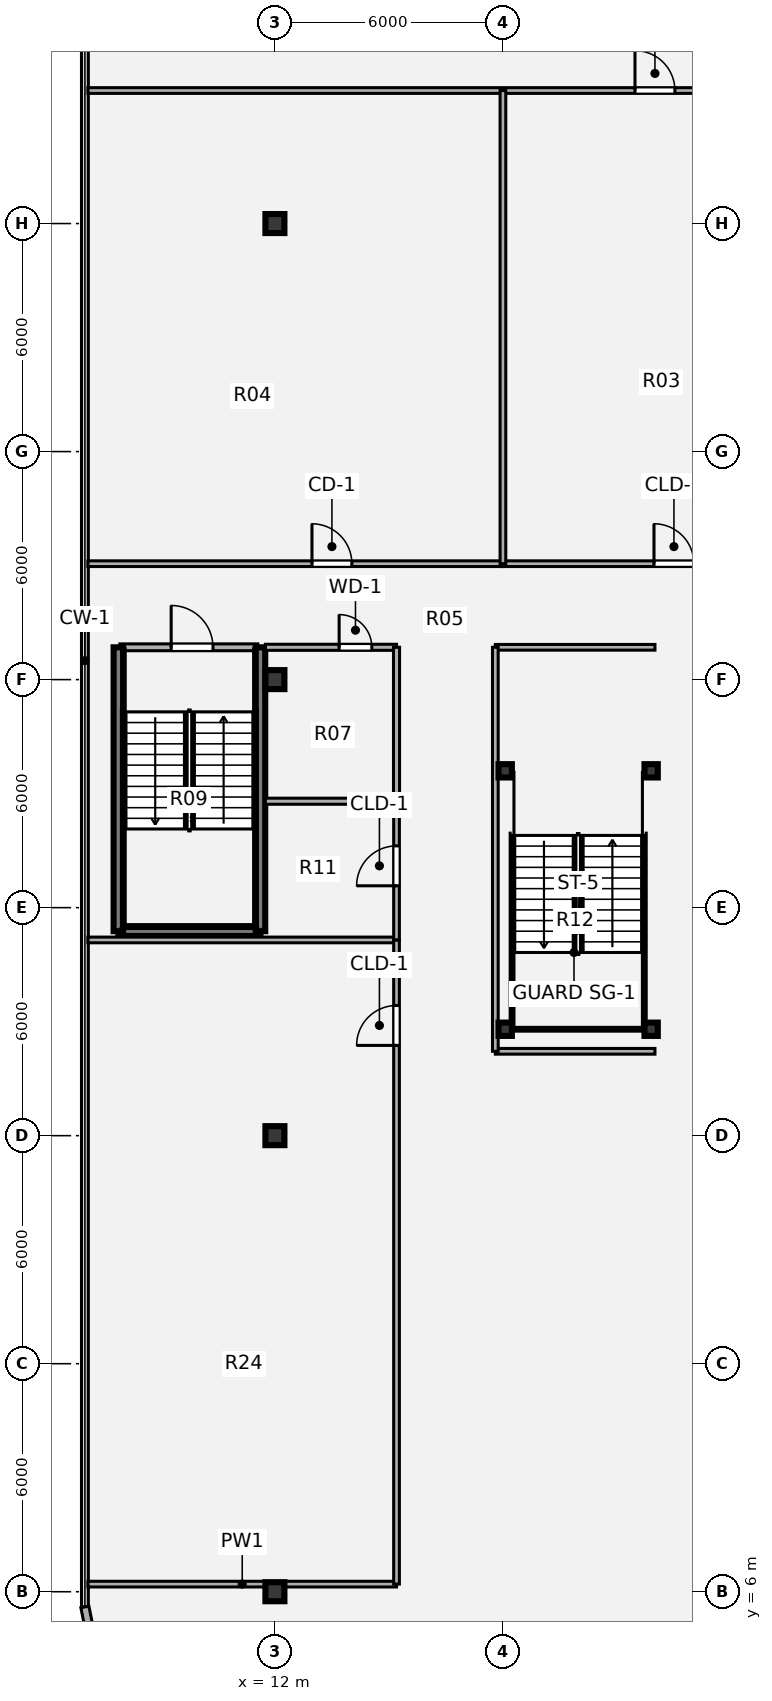
"""IFC4 building model, lengths in metres.
Left out: names, types, materials, properties, quantities, classifications, styles, units other than length and angle.
Written with IfcOpenShell. Run it as: python <this file> out.ifc"""

import sys

from ifc_helpers import new_model, si_unit, direction, frame, frame_2d, origin, origin_2d, place, context, subcontext, project, spatial, rectangle, hollow_rectangle, i_section, extrude, source, transform, mapped, element, fill, save


model = new_model("IFC4")
c1 = context("Model", 3, precision=1e-05, world=origin(), true_north=direction((0.0, 1.0)))
c2 = subcontext(c1, "Body", "Model", "MODEL_VIEW")
j1 = project(units=[si_unit("LENGTHUNIT", "METRE"), si_unit("PLANEANGLEUNIT", "RADIAN")], contexts=[c1])
p1 = place(None, origin())
s1 = spatial("IfcSite", under=j1, at=p1, CompositionType="ELEMENT")
p2 = place(p1, origin())
s2 = spatial("IfcBuilding", under=s1, at=p2, CompositionType="ELEMENT")
p3 = place(p2, frame((0.0, 0.0, 5.4)))
s3 = spatial("IfcBuildingStorey", under=s2, at=p3, CompositionType="ELEMENT", Elevation=5.4)
m1 = source(origin(), c2, "Body", "SweptSolid", [
    extrude(i_section(OverallWidth=0.5, OverallDepth=0.5, WebThickness=0.028, FlangeThickness=0.045, at=origin_2d()), origin(), (0.0, 0.0, 1.0), 4.32),
])
for number, where, z_axis, x_axis in (
    (1, (12.0, 6.0, 0.0), (0.0, 0.0, 1.0), (1.0, 0.0, 0.0)),
    (2, (12.0, 18.0, 0.0), (0.0, 0.0, 1.0), (1.0, 0.0, 0.0)),
    (3, (12.0, 30.0, 0.0), (0.0, 0.0, 1.0), (1.0, 0.0, 0.0)),
    (4, (12.0, 42.0, 0.0), (0.0, 0.0, 1.0), (1.0, 0.0, 0.0)),
):
    element("IfcColumn", number, at=place(p3, frame(where, z_axis=z_axis, x_axis=x_axis)), inside=s3, PredefinedType="COLUMN", context=c2, shape_type="MappedRepresentation", body=[
        mapped(m1, transform((0.0, 0.0, 0.0), x_axis=(1.0, 0.0, 0.0), y_axis=(0.0, 1.0, 0.0), z_axis=(0.0, 0.0, 1.0), scale=1.0)),
    ])
m2 = source(origin(), c2, "Body", "SweptSolid", [
    extrude(hollow_rectangle(XDim=0.35, YDim=0.35, WallThickness=0.016, OuterFilletRadius=0.032, at=origin_2d()), origin(), (0.0, 0.0, 1.0), 4.32),
])
for number, where, z_axis, x_axis in (
    (5, (18.06, 20.8, 0.0), (0.0, 0.0, 1.0), (1.0, 0.0, 0.0)),
    (6, (21.9, 20.8, 0.0), (0.0, 0.0, 1.0), (1.0, 0.0, 0.0)),
    (7, (18.06, 27.6, 0.0), (0.0, 0.0, 1.0), (1.0, 0.0, 0.0)),
    (8, (21.9, 27.6, 0.0), (0.0, 0.0, 1.0), (1.0, 0.0, 0.0)),
):
    element("IfcColumn", number, at=place(p3, frame(where, z_axis=z_axis, x_axis=x_axis)), inside=s3, PredefinedType="COLUMN", context=c2, shape_type="MappedRepresentation", body=[
        mapped(m2, transform((0.0, 0.0, 0.0), x_axis=(1.0, 0.0, 0.0), y_axis=(0.0, 1.0, 0.0), z_axis=(0.0, 0.0, 1.0), scale=1.0)),
    ])
p4 = place(p3, frame((7.244, 4.375, 0.0), z_axis=(0.0, 0.0, 1.0), x_axis=(-0.195138390419, 0.980775717779, 0.0)))
e9 = element("IfcWall", 9, at=p4, inside=s3, PredefinedType="SOLIDWALL", context=c2, shape_type="SweptSolid", body=[
    extrude(rectangle(XDim=1.249, YDim=0.215, at=frame_2d((0.624, 0.0))), origin(), (0.0, 0.0, 1.0), 4.04),
])
p5 = place(p3, frame((7.92, 30.85, 0.0), z_axis=(0.0, 0.0, 1.0), x_axis=(1.0, 0.0, 0.0)))
e10 = element("IfcWall", 10, at=p5, inside=s3, PredefinedType="PARTITIONING", context=c2, shape_type="SweptSolid", body=[
    extrude(rectangle(XDim=3.63, YDim=0.18, at=frame_2d((1.815, 0.0))), origin(), (0.0, 0.0, 1.0), 4.04),
])
p6 = place(p5, frame((1.35, 0.0, 0.0)))
e11 = element("IfcOpeningElement", 11, at=p6, cuts=e10, PredefinedType="OPENING", context=c2, shape_type="SweptSolid", body=[
    extrude(rectangle(XDim=1.1, YDim=2.1, at=origin_2d()), frame((0.55, 0.1, 1.05), z_axis=(0.0, -1.0, 0.0), x_axis=(1.0, 0.0, 0.0)), (0.0, 0.0, 1.0), 0.2),
])
p7 = place(p3, frame((7.88, 23.38, 0.0), z_axis=(0.0, 0.0, 1.0), x_axis=(1.0, 0.0, 0.0)))
e12 = element("IfcWall", 12, at=p7, inside=s3, PredefinedType="SHEAR", context=c2, shape_type="SweptSolid", body=[
    extrude(rectangle(XDim=3.74, YDim=0.25, at=frame_2d((1.87, 0.0))), origin(), (0.0, 0.0, 1.0), 4.32),
])
for number, where, z_axis, x_axis in (
    (13, (7.88, 23.38, 0.0), (0.0, 0.0, 1.0), (0.0, 1.0, 0.0)),
    (14, (11.62, 23.38, 0.0), (0.0, 0.0, 1.0), (0.0, 1.0, 0.0)),
):
    element("IfcWall", number, at=place(p3, frame(where, z_axis=z_axis, x_axis=x_axis)), inside=s3, PredefinedType="SHEAR", context=c2, shape_type="SweptSolid", body=[
        extrude(rectangle(XDim=7.47, YDim=0.25, at=frame_2d((3.735, 0.0))), origin(), (0.0, 0.0, 1.0), 4.32),
    ])
p8 = place(p3, frame((7.08, 6.2, 0.0), z_axis=(0.0, 0.0, 1.0), x_axis=(1.0, 0.0, 0.0)))
e15 = element("IfcWall", 15, at=p8, inside=s3, PredefinedType="PARTITIONING", context=c2, shape_type="SweptSolid", body=[
    extrude(rectangle(XDim=8.12, YDim=0.15, at=frame_2d((4.06, 0.0))), origin(), (0.0, 0.0, 1.0), 3.125),
])
p9 = place(p3, frame((17.8, 20.22, 0.0), z_axis=(0.0, 0.0, 1.0), x_axis=(1.0, 0.0, 0.0)))
e16 = element("IfcWall", 16, at=p9, inside=s3, PredefinedType="PARTITIONING", context=c2, shape_type="SweptSolid", body=[
    extrude(rectangle(XDim=4.2, YDim=0.15, at=frame_2d((2.1, 0.0))), origin(), (0.0, 0.0, 1.0), 4.01),
])
p10 = place(p3, frame((7.08, 23.15, 0.0), z_axis=(0.0, 0.0, 1.0), x_axis=(1.0, 0.0, 0.0)))
e17 = element("IfcWall", 17, at=p10, inside=s3, PredefinedType="PARTITIONING", context=c2, shape_type="SweptSolid", body=[
    extrude(rectangle(XDim=8.12, YDim=0.15, at=frame_2d((4.06, 0.0))), origin(), (0.0, 0.0, 1.0), 4.01),
])
p11 = place(p3, frame((11.75, 26.8, 0.0), z_axis=(0.0, 0.0, 1.0), x_axis=(1.0, 0.0, 0.0)))
e18 = element("IfcWall", 18, at=p11, inside=s3, PredefinedType="PLUMBINGWALL", context=c2, shape_type="SweptSolid", body=[
    extrude(rectangle(XDim=3.45, YDim=0.16, at=frame_2d((1.725, 0.0))), origin(), (0.0, 0.0, 1.0), 4.01),
])
p12 = place(p3, frame((11.75, 30.85, 0.0), z_axis=(0.0, 0.0, 1.0), x_axis=(1.0, 0.0, 0.0)))
e19 = element("IfcWall", 19, at=p12, inside=s3, PredefinedType="PLUMBINGWALL", context=c2, shape_type="SweptSolid", body=[
    extrude(rectangle(XDim=3.45, YDim=0.16, at=frame_2d((1.725, 0.0))), origin(), (0.0, 0.0, 1.0), 4.01),
])
p13 = place(p12, frame((1.94, 0.0, 0.0)))
e20 = element("IfcOpeningElement", 20, at=p13, cuts=e19, PredefinedType="OPENING", context=c2, shape_type="SweptSolid", body=[
    extrude(rectangle(XDim=0.86, YDim=2.1, at=origin_2d()), frame((0.43, 0.09, 1.05), z_axis=(0.0, -1.0, 0.0), x_axis=(1.0, 0.0, 0.0)), (0.0, 0.0, 1.0), 0.18),
])
p14 = place(p3, frame((17.8, 30.85, 0.0), z_axis=(0.0, 0.0, 1.0), x_axis=(1.0, 0.0, 0.0)))
e21 = element("IfcWall", 21, at=p14, inside=s3, PredefinedType="PARTITIONING", context=c2, shape_type="SweptSolid", body=[
    extrude(rectangle(XDim=4.2, YDim=0.15, at=frame_2d((2.1, 0.0))), origin(), (0.0, 0.0, 1.0), 4.01),
])
p15 = place(p3, frame((7.08, 33.05, 0.0), z_axis=(0.0, 0.0, 1.0), x_axis=(1.0, 0.0, 0.0)))
e22 = element("IfcWall", 22, at=p15, inside=s3, PredefinedType="PARTITIONING", context=c2, shape_type="SweptSolid", body=[
    extrude(rectangle(XDim=10.92, YDim=0.15, at=frame_2d((5.46, 0.0))), origin(), (0.0, 0.0, 1.0), 4.01),
])
p16 = place(p15, frame((5.895, 0.0, 0.0)))
e23 = element("IfcOpeningElement", 23, at=p16, cuts=e22, PredefinedType="OPENING", context=c2, shape_type="SweptSolid", body=[
    extrude(rectangle(XDim=1.05, YDim=2.1, at=origin_2d()), frame((0.525, 0.085, 1.05), z_axis=(0.0, -1.0, 0.0), x_axis=(1.0, 0.0, 0.0)), (0.0, 0.0, 1.0), 0.17),
])
p17 = place(p3, frame((18.0, 33.05, 0.0), z_axis=(0.0, 0.0, 1.0), x_axis=(1.0, 0.0, 0.0)))
e24 = element("IfcWall", 24, at=p17, inside=s3, PredefinedType="PARTITIONING", context=c2, shape_type="SweptSolid", body=[
    extrude(rectangle(XDim=9.0, YDim=0.15, at=frame_2d((4.5, 0.0))), origin(), (0.0, 0.0, 1.0), 4.01),
])
p18 = place(p17, frame((3.975, 0.0, 0.0)))
e25 = element("IfcOpeningElement", 25, at=p18, cuts=e24, PredefinedType="OPENING", context=c2, shape_type="SweptSolid", body=[
    extrude(rectangle(XDim=1.05, YDim=2.1, at=origin_2d()), frame((0.525, 0.085, 1.05), z_axis=(0.0, -1.0, 0.0), x_axis=(1.0, 0.0, 0.0)), (0.0, 0.0, 1.0), 0.17),
])
p19 = place(p3, frame((7.08, 45.5, 0.0), z_axis=(0.0, 0.0, 1.0), x_axis=(1.0, 0.0, 0.0)))
e26 = element("IfcWall", 26, at=p19, inside=s3, PredefinedType="PARTITIONING", context=c2, shape_type="SweptSolid", body=[
    extrude(rectangle(XDim=28.92, YDim=0.15, at=frame_2d((14.46, 0.0))), origin(), (0.0, 0.0, 1.0), 4.01),
])
p20 = place(p19, frame((14.395, 0.0, 0.0)))
e27 = element("IfcOpeningElement", 27, at=p20, cuts=e26, PredefinedType="OPENING", context=c2, shape_type="SweptSolid", body=[
    extrude(rectangle(XDim=1.05, YDim=2.1, at=origin_2d()), frame((0.525, 0.085, 1.05), z_axis=(0.0, -1.0, 0.0), x_axis=(1.0, 0.0, 0.0)), (0.0, 0.0, 1.0), 0.17),
])
p21 = place(p3, frame((15.2, 6.2, 0.0), z_axis=(0.0, 0.0, 1.0), x_axis=(0.0, 1.0, 0.0)))
e28 = element("IfcWall", 28, at=p21, inside=s3, PredefinedType="PARTITIONING", context=c2, shape_type="SweptSolid", body=[
    extrude(rectangle(XDim=16.95, YDim=0.15, at=frame_2d((8.475, 0.0))), origin(), (0.0, 0.0, 1.0), 4.01),
])
p22 = place(p21, frame((14.175, 0.0, 0.0)))
e29 = element("IfcOpeningElement", 29, at=p22, cuts=e28, PredefinedType="OPENING", context=c2, shape_type="SweptSolid", body=[
    extrude(rectangle(XDim=1.05, YDim=2.1, at=origin_2d()), frame((0.525, 0.085, 1.05), z_axis=(0.0, -1.0, 0.0), x_axis=(1.0, 0.0, 0.0)), (0.0, 0.0, 1.0), 0.17),
])
p23 = place(p3, frame((15.2, 23.15, 0.0), z_axis=(0.0, 0.0, 1.0), x_axis=(0.0, 1.0, 0.0)))
e30 = element("IfcWall", 30, at=p23, inside=s3, PredefinedType="PARTITIONING", context=c2, shape_type="SweptSolid", body=[
    extrude(rectangle(XDim=3.65, YDim=0.15, at=frame_2d((1.825, 0.0))), origin(), (0.0, 0.0, 1.0), 4.01),
])
p24 = place(p23, frame((1.425, 0.0, 0.0)))
e31 = element("IfcOpeningElement", 31, at=p24, cuts=e30, PredefinedType="OPENING", context=c2, shape_type="SweptSolid", body=[
    extrude(rectangle(XDim=1.05, YDim=2.1, at=origin_2d()), frame((0.525, 0.085, 1.05), z_axis=(0.0, -1.0, 0.0), x_axis=(1.0, 0.0, 0.0)), (0.0, 0.0, 1.0), 0.17),
])
p25 = place(p3, frame((15.2, 26.8, 0.0), z_axis=(0.0, 0.0, 1.0), x_axis=(0.0, 1.0, 0.0)))
e32 = element("IfcWall", 32, at=p25, inside=s3, PredefinedType="PLUMBINGWALL", context=c2, shape_type="SweptSolid", body=[
    extrude(rectangle(XDim=4.05, YDim=0.16, at=frame_2d((2.025, 0.0))), origin(), (0.0, 0.0, 1.0), 3.666),
])
p26 = place(p3, frame((17.8, 20.22, 0.0), z_axis=(0.0, 0.0, 1.0), x_axis=(0.0, 1.0, 0.0)))
e33 = element("IfcWall", 33, at=p26, inside=s3, PredefinedType="PARTITIONING", context=c2, shape_type="SweptSolid", body=[
    extrude(rectangle(XDim=10.63, YDim=0.15, at=frame_2d((5.315, 0.0))), origin(), (0.0, 0.0, 1.0), 3.666),
])
p27 = place(p3, frame((18.0, 33.05, 0.0), z_axis=(0.0, 0.0, 1.0), x_axis=(0.0, 1.0, 0.0)))
e34 = element("IfcWall", 34, at=p27, inside=s3, PredefinedType="PARTITIONING", context=c2, shape_type="SweptSolid", body=[
    extrude(rectangle(XDim=12.45, YDim=0.15, at=frame_2d((6.225, 0.0))), origin(), (0.0, 0.0, 1.0), 3.666),
])
m3 = source(origin(), c2, "Body", "SweptSolid", [
    extrude(rectangle(XDim=1.1, YDim=2.1, at=origin_2d()), frame((0.55, 0.025, 1.05), z_axis=(0.0, -1.0, 0.0), x_axis=(1.0, 0.0, 0.0)), (0.0, 0.0, 1.0), 0.05),
])
p28 = place(p6, origin())
e35 = element("IfcDoor", 35, at=p28, inside=s3, OperationType="SINGLE_SWING_LEFT", PredefinedType="DOOR", context=c2, shape_type="MappedRepresentation", body=[
    mapped(m3, transform((0.0, 0.0, 0.0), x_axis=(1.0, 0.0, 0.0), y_axis=(0.0, 1.0, 0.0), z_axis=(0.0, 0.0, 1.0), scale=1.0)),
])
fill(e11, e35)
m4 = source(origin(), c2, "Body", "SweptSolid", [
    extrude(rectangle(XDim=0.86, YDim=2.1, at=origin_2d()), frame((0.43, 0.025, 1.05), z_axis=(0.0, -1.0, 0.0), x_axis=(1.0, 0.0, 0.0)), (0.0, 0.0, 1.0), 0.05),
])
p29 = place(p13, origin())
e36 = element("IfcDoor", 36, at=p29, inside=s3, OperationType="SINGLE_SWING_LEFT", PredefinedType="DOOR", context=c2, shape_type="MappedRepresentation", body=[
    mapped(m4, transform((0.0, 0.0, 0.0), x_axis=(1.0, 0.0, 0.0), y_axis=(0.0, 1.0, 0.0), z_axis=(0.0, 0.0, 1.0), scale=1.0)),
])
fill(e20, e36)
m5 = source(origin(), c2, "Body", "SweptSolid", [
    extrude(rectangle(XDim=1.05, YDim=2.1, at=origin_2d()), frame((0.525, 0.025, 1.05), z_axis=(0.0, -1.0, 0.0), x_axis=(1.0, 0.0, 0.0)), (0.0, 0.0, 1.0), 0.05),
])
p30 = place(p16, origin())
e37 = element("IfcDoor", 37, at=p30, inside=s3, OperationType="SINGLE_SWING_LEFT", PredefinedType="DOOR", context=c2, shape_type="MappedRepresentation", body=[
    mapped(m5, transform((0.0, 0.0, 0.0), x_axis=(1.0, 0.0, 0.0), y_axis=(0.0, 1.0, 0.0), z_axis=(0.0, 0.0, 1.0), scale=1.0)),
])
fill(e23, e37)
m6 = source(origin(), c2, "Body", "SweptSolid", [
    extrude(rectangle(XDim=1.05, YDim=2.1, at=origin_2d()), frame((0.525, 0.025, 1.05), z_axis=(0.0, -1.0, 0.0), x_axis=(1.0, 0.0, 0.0)), (0.0, 0.0, 1.0), 0.05),
])
p31 = place(p18, origin())
e38 = element("IfcDoor", 38, at=p31, inside=s3, OperationType="SINGLE_SWING_LEFT", PredefinedType="DOOR", context=c2, shape_type="MappedRepresentation", body=[
    mapped(m6, transform((0.0, 0.0, 0.0), x_axis=(1.0, 0.0, 0.0), y_axis=(0.0, 1.0, 0.0), z_axis=(0.0, 0.0, 1.0), scale=1.0)),
])
fill(e25, e38)
p32 = place(p20, origin())
e39 = element("IfcDoor", 39, at=p32, inside=s3, OperationType="SINGLE_SWING_LEFT", PredefinedType="DOOR", context=c2, shape_type="MappedRepresentation", body=[
    mapped(m6, transform((0.0, 0.0, 0.0), x_axis=(1.0, 0.0, 0.0), y_axis=(0.0, 1.0, 0.0), z_axis=(0.0, 0.0, 1.0), scale=1.0)),
])
fill(e27, e39)
p33 = place(p22, origin())
e40 = element("IfcDoor", 40, at=p33, inside=s3, OperationType="SINGLE_SWING_LEFT", PredefinedType="DOOR", context=c2, shape_type="MappedRepresentation", body=[
    mapped(m6, transform((0.0, 0.0, 0.0), x_axis=(1.0, 0.0, 0.0), y_axis=(0.0, 1.0, 0.0), z_axis=(0.0, 0.0, 1.0), scale=1.0)),
])
fill(e29, e40)
p34 = place(p24, origin())
e41 = element("IfcDoor", 41, at=p34, inside=s3, OperationType="SINGLE_SWING_LEFT", PredefinedType="DOOR", context=c2, shape_type="MappedRepresentation", body=[
    mapped(m6, transform((0.0, 0.0, 0.0), x_axis=(1.0, 0.0, 0.0), y_axis=(0.0, 1.0, 0.0), z_axis=(0.0, 0.0, 1.0), scale=1.0)),
])
fill(e31, e41)
save(model, sys.argv[1])
